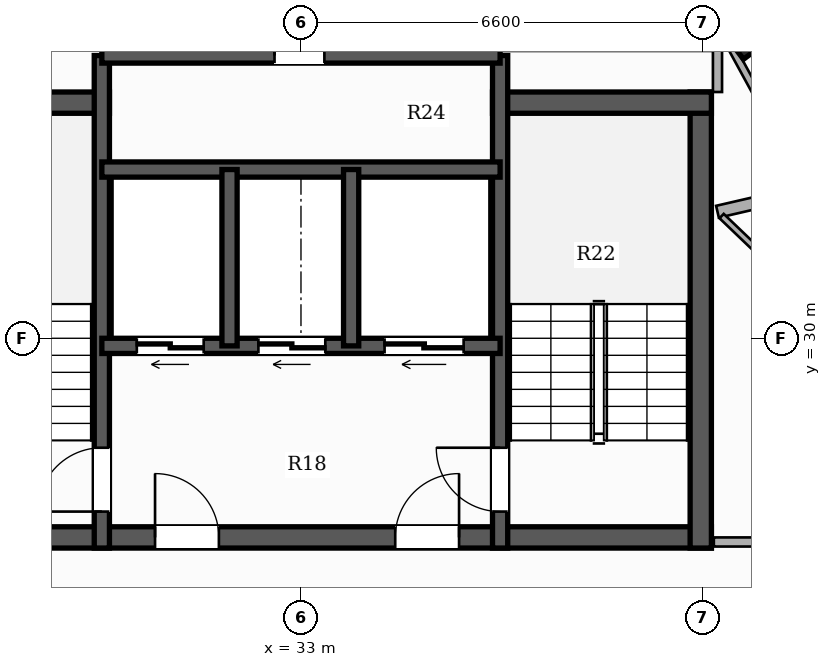
"""IFC4 building model, lengths in metres.
Left out: names, types, materials, properties, quantities, classifications, styles, units other than length and angle.
Written with IfcOpenShell. Run it as: python <this file> out.ifc"""

import sys

from ifc_helpers import new_model, si_unit, direction, frame, frame_2d, origin, origin_2d, place, context, subcontext, project, spatial, rectangle, hollow_rectangle, extrude, element, fill, save


model = new_model("IFC4")
c1 = context("Model", 3, precision=1e-05, world=origin(), true_north=direction((0.0, 1.0)))
c2 = subcontext(c1, "Body", "Model", "MODEL_VIEW")
j1 = project(units=[si_unit("LENGTHUNIT", "METRE"), si_unit("PLANEANGLEUNIT", "RADIAN")], contexts=[c1])
p1 = place(None, origin())
s1 = spatial("IfcSite", under=j1, at=p1, CompositionType="ELEMENT")
p2 = place(p1, origin())
s2 = spatial("IfcBuilding", under=s1, at=p2, CompositionType="ELEMENT")
p3 = place(p2, frame((0.0, 0.0, 222.8)))
s3 = spatial("IfcBuildingStorey", under=s2, at=p3, CompositionType="ELEMENT", Elevation=222.8)
p4 = place(p3, frame((26.25, 26.725, 0.0), z_axis=(0.0, 0.0, 1.0), x_axis=(1.0, 0.0, 0.0)))
e1 = element("IfcWall", 1, at=p4, inside=s3, PredefinedType="SHEAR", context=c2, shape_type="SweptSolid", body=[
    extrude(rectangle(XDim=13.5, YDim=0.35, at=frame_2d((6.75, 0.0))), origin(), (0.0, 0.0, 1.0), 3.3),
])
p5 = place(p4, frame((4.35, 0.0, 0.0)))
e2 = element("IfcOpeningElement", 2, at=p5, cuts=e1, PredefinedType="OPENING", context=c2, shape_type="SweptSolid", body=[
    extrude(rectangle(XDim=1.05, YDim=2.15, at=frame_2d((0.525, 1.075))), frame((0.0, 0.185, 0.0), z_axis=(0.0, -1.0, 0.0), x_axis=(1.0, 0.0, 0.0)), (0.0, 0.0, 1.0), 0.37),
])
p6 = place(p4, frame((8.3, 0.0, 0.0)))
e3 = element("IfcOpeningElement", 3, at=p6, cuts=e1, PredefinedType="OPENING", context=c2, shape_type="SweptSolid", body=[
    extrude(rectangle(XDim=1.05, YDim=2.15, at=frame_2d((0.525, 1.075))), frame((0.0, 0.185, 0.0), z_axis=(0.0, -1.0, 0.0), x_axis=(1.0, 0.0, 0.0)), (0.0, 0.0, 1.0), 0.37),
])
p7 = place(p3, frame((26.25, 33.875, 0.0), z_axis=(0.0, 0.0, 1.0), x_axis=(1.0, 0.0, 0.0)))
e4 = element("IfcWall", 4, at=p7, inside=s3, PredefinedType="SHEAR", context=c2, shape_type="SweptSolid", body=[
    extrude(rectangle(XDim=3.6, YDim=0.35, at=frame_2d((1.8, 0.0))), origin(), (0.0, 0.0, 1.0), 3.3),
])
p8 = place(p3, frame((39.575, 26.55, 0.0), z_axis=(0.0, 0.0, 1.0), x_axis=(0.0, 1.0, 0.0)))
e5 = element("IfcWall", 5, at=p8, inside=s3, PredefinedType="SHEAR", context=c2, shape_type="SweptSolid", body=[
    extrude(rectangle(XDim=7.5, YDim=0.35, at=frame_2d((3.75, 0.0))), origin(), (0.0, 0.0, 1.0), 3.3),
])
p9 = place(p3, frame((36.15, 33.875, 0.0), z_axis=(0.0, 0.0, 1.0), x_axis=(1.0, 0.0, 0.0)))
e6 = element("IfcWall", 6, at=p9, inside=s3, PredefinedType="SHEAR", context=c2, shape_type="SweptSolid", body=[
    extrude(rectangle(XDim=3.6, YDim=0.35, at=frame_2d((1.8, 0.0))), origin(), (0.0, 0.0, 1.0), 3.3),
])
p10 = place(p3, frame((29.725, 26.55, 0.0), z_axis=(0.0, 0.0, 1.0), x_axis=(0.0, 1.0, 0.0)))
e7 = element("IfcWall", 7, at=p10, inside=s3, PredefinedType="SHEAR", context=c2, shape_type="SweptSolid", body=[
    extrude(rectangle(XDim=8.1, YDim=0.25, at=frame_2d((4.05, 0.0))), origin(), (0.0, 0.0, 1.0), 3.3),
])
p11 = place(p10, frame((0.6, 0.0, 0.0)))
e8 = element("IfcOpeningElement", 8, at=p11, cuts=e7, PredefinedType="OPENING", context=c2, shape_type="SweptSolid", body=[
    extrude(rectangle(XDim=1.05, YDim=2.15, at=frame_2d((0.525, 1.075))), frame((0.0, 0.135, 0.0), z_axis=(0.0, -1.0, 0.0), x_axis=(1.0, 0.0, 0.0)), (0.0, 0.0, 1.0), 0.27),
])
p12 = place(p3, frame((36.275, 26.55, 0.0), z_axis=(0.0, 0.0, 1.0), x_axis=(0.0, 1.0, 0.0)))
e9 = element("IfcWall", 9, at=p12, inside=s3, PredefinedType="SHEAR", context=c2, shape_type="SweptSolid", body=[
    extrude(rectangle(XDim=8.1, YDim=0.25, at=frame_2d((4.05, 0.0))), origin(), (0.0, 0.0, 1.0), 3.3),
])
p13 = place(p12, frame((0.6, 0.0, 0.0)))
e10 = element("IfcOpeningElement", 10, at=p13, cuts=e9, PredefinedType="OPENING", context=c2, shape_type="SweptSolid", body=[
    extrude(rectangle(XDim=1.05, YDim=2.15, at=frame_2d((0.525, 1.075))), frame((0.0, 0.135, 0.0), z_axis=(0.0, -1.0, 0.0), x_axis=(1.0, 0.0, 0.0)), (0.0, 0.0, 1.0), 0.27),
])
p14 = place(p3, frame((36.275, 29.875, 0.0), z_axis=(0.0, 0.0, 1.0), x_axis=(-1.0, 0.0, 0.0)))
e11 = element("IfcWall", 11, at=p14, inside=s3, PredefinedType="SHEAR", context=c2, shape_type="SweptSolid", body=[
    extrude(rectangle(XDim=6.55, YDim=0.25, at=frame_2d((3.275, 0.0))), origin(), (0.0, 0.0, 1.0), 3.3),
])
p15 = place(p14, frame((4.875, 0.0, 0.0)))
e12 = element("IfcOpeningElement", 12, at=p15, cuts=e11, PredefinedType="OPENING", context=c2, shape_type="SweptSolid", body=[
    extrude(rectangle(XDim=1.1, YDim=2.2, at=frame_2d((0.55, 1.1))), frame((0.0, 0.135, 0.0), z_axis=(0.0, -1.0, 0.0), x_axis=(1.0, 0.0, 0.0)), (0.0, 0.0, 1.0), 0.27),
])
p16 = place(p14, frame((2.875, 0.0, 0.0)))
e13 = element("IfcOpeningElement", 13, at=p16, cuts=e11, PredefinedType="OPENING", context=c2, shape_type="SweptSolid", body=[
    extrude(rectangle(XDim=1.1, YDim=2.2, at=frame_2d((0.55, 1.1))), frame((0.0, 0.135, 0.0), z_axis=(0.0, -1.0, 0.0), x_axis=(1.0, 0.0, 0.0)), (0.0, 0.0, 1.0), 0.27),
])
p17 = place(p14, frame((0.6, 0.0, 0.0)))
e14 = element("IfcOpeningElement", 14, at=p17, cuts=e11, PredefinedType="OPENING", context=c2, shape_type="SweptSolid", body=[
    extrude(rectangle(XDim=1.3, YDim=2.2, at=frame_2d((0.65, 1.1))), frame((0.0, 0.135, 0.0), z_axis=(0.0, -1.0, 0.0), x_axis=(1.0, 0.0, 0.0)), (0.0, 0.0, 1.0), 0.27),
])
p18 = place(p3, frame((29.725, 32.775, 0.0), z_axis=(0.0, 0.0, 1.0), x_axis=(1.0, 0.0, 0.0)))
e15 = element("IfcWall", 15, at=p18, inside=s3, PredefinedType="SHEAR", context=c2, shape_type="SweptSolid", body=[
    extrude(rectangle(XDim=6.55, YDim=0.25, at=frame_2d((3.275, 0.0))), origin(), (0.0, 0.0, 1.0), 3.3),
])
for number, where, z_axis, x_axis in (
    (16, (31.825, 29.875, 0.0), (0.0, 0.0, 1.0), (0.0, 1.0, 0.0)),
    (17, (33.825, 29.875, 0.0), (0.0, 0.0, 1.0), (0.0, 1.0, 0.0)),
):
    element("IfcWall", number, at=place(p3, frame(where, z_axis=z_axis, x_axis=x_axis)), inside=s3, PredefinedType="SHEAR", context=c2, shape_type="SweptSolid", body=[
        extrude(rectangle(XDim=2.9, YDim=0.25, at=frame_2d((1.45, 0.0))), origin(), (0.0, 0.0, 1.0), 3.3),
    ])
p19 = place(p3, frame((29.725, 34.65, 0.0), z_axis=(0.0, 0.0, 1.0), x_axis=(1.0, 0.0, 0.0)))
e18 = element("IfcWall", 18, at=p19, inside=s3, PredefinedType="SHEAR", context=c2, shape_type="SweptSolid", body=[
    extrude(rectangle(XDim=6.55, YDim=0.25, at=frame_2d((3.275, 0.0))), origin(), (0.0, 0.0, 1.0), 3.3),
])
p20 = place(p19, frame((2.84, 0.0, 0.0)))
e19 = element("IfcOpeningElement", 19, at=p20, cuts=e18, PredefinedType="OPENING", context=c2, shape_type="SweptSolid", body=[
    extrude(rectangle(XDim=0.82, YDim=2.1, at=frame_2d((0.41, 1.05))), frame((0.0, 0.135, 0.0), z_axis=(0.0, -1.0, 0.0), x_axis=(1.0, 0.0, 0.0)), (0.0, 0.0, 1.0), 0.27),
])
p21 = place(p3, frame((40.352, 35.113, 0.0), z_axis=(0.0, 0.0, 1.0), x_axis=(-0.600420225326, 0.799684658487, 0.0)))
e20 = element("IfcColumn", 20, at=p21, inside=s3, PredefinedType="COLUMN", context=c2, shape_type="SweptSolid", body=[
    extrude(hollow_rectangle(XDim=0.75, YDim=0.75, WallThickness=0.025, at=origin_2d()), origin(), (0.0, 0.0, 1.0), 3.3),
])
p22 = place(p3, frame((39.79, 26.65, 0.0), z_axis=(0.0, 0.0, 1.0), x_axis=(1.0, 0.0, 0.0)))
e21 = element("IfcWall", 21, at=p22, inside=s3, PredefinedType="PARTITIONING", context=c2, shape_type="SweptSolid", body=[
    extrude(rectangle(XDim=2.46, YDim=0.15, at=frame_2d((1.23, 0.0))), origin(), (0.0, 0.0, 1.0), 2.565),
])
p23 = place(p3, frame((39.85, 34.74, 0.0), z_axis=(0.0, 0.0, 1.0), x_axis=(0.0, -1.0, 0.0)))
e22 = element("IfcWall", 22, at=p23, inside=s3, PredefinedType="PARTITIONING", context=c2, shape_type="SweptSolid", body=[
    extrude(rectangle(XDim=0.69, YDim=0.15, at=frame_2d((0.345, 0.0))), origin(), (0.0, 0.0, 1.0), 2.773),
])
p24 = place(p3, frame((39.85, 32.081, 0.0), z_axis=(0.0, 0.0, 1.0), x_axis=(0.974339670333, 0.225082666628, 0.0)))
e23 = element("IfcWall", 23, at=p24, inside=s3, PredefinedType="PARTITIONING", context=c2, shape_type="SweptSolid", body=[
    extrude(rectangle(XDim=4.714, YDim=0.2, at=frame_2d((2.357, 0.0))), origin(), (0.0, 0.0, 1.0), 2.492),
])
p25 = place(p3, frame((39.918, 32.01, 0.0), z_axis=(0.0, 0.0, 1.0), x_axis=(0.722311203135, -0.691568164266, 0.0)))
e24 = element("IfcWall", 24, at=p25, inside=s3, PredefinedType="PARTITIONING", context=c2, shape_type="SweptSolid", body=[
    extrude(rectangle(XDim=4.876, YDim=0.1, at=frame_2d((2.438, 0.0))), origin(), (0.0, 0.0, 1.0), 2.773),
])
p26 = place(p25, frame((1.998, 0.0, 0.0)))
e25 = element("IfcOpeningElement", 25, at=p26, cuts=e24, PredefinedType="OPENING", context=c2, shape_type="SweptSolid", body=[
    extrude(rectangle(XDim=0.88, YDim=2.1, at=frame_2d((0.44, 1.05))), frame((0.0, 0.06, 0.0), z_axis=(0.0, -1.0, 0.0), x_axis=(1.0, 0.0, 0.0)), (0.0, 0.0, 1.0), 0.12),
])
p27 = place(p3, frame((38.357, 37.934, 0.0), z_axis=(0.0, 0.0, 1.0), x_axis=(0.479839410825, -0.877356335715, 0.0)))
e26 = element("IfcWall", 26, at=p27, inside=s3, PredefinedType="PARTITIONING", context=c2, shape_type="SweptSolid", body=[
    extrude(rectangle(XDim=6.183, YDim=0.12, at=frame_2d((3.092, 0.0))), origin(), (0.0, 0.0, 1.0), 2.492),
])
p28 = place(p11, origin())
e27 = element("IfcDoor", 27, at=p28, inside=s3, OperationType="SINGLE_SWING_LEFT", PredefinedType="DOOR", context=c2, shape_type="SweptSolid", body=[
    extrude(rectangle(XDim=1.05, YDim=2.15, at=frame_2d((0.525, 1.075))), frame((0.0, 0.025, 0.0), z_axis=(0.0, -1.0, 0.0), x_axis=(1.0, 0.0, 0.0)), (0.0, 0.0, 1.0), 0.05),
])
fill(e8, e27)
p29 = place(p13, origin())
e28 = element("IfcDoor", 28, at=p29, inside=s3, OperationType="SINGLE_SWING_RIGHT", PredefinedType="DOOR", context=c2, shape_type="SweptSolid", body=[
    extrude(rectangle(XDim=1.05, YDim=2.15, at=frame_2d((0.525, 1.075))), frame((0.0, 0.025, 0.0), z_axis=(0.0, -1.0, 0.0), x_axis=(1.0, 0.0, 0.0)), (0.0, 0.0, 1.0), 0.05),
])
fill(e10, e28)
p30 = place(p5, origin())
e29 = element("IfcDoor", 29, at=p30, inside=s3, OperationType="SINGLE_SWING_LEFT", PredefinedType="DOOR", context=c2, shape_type="SweptSolid", body=[
    extrude(rectangle(XDim=1.05, YDim=2.15, at=frame_2d((0.525, 1.075))), frame((0.0, 0.025, 0.0), z_axis=(0.0, -1.0, 0.0), x_axis=(1.0, 0.0, 0.0)), (0.0, 0.0, 1.0), 0.05),
])
fill(e2, e29)
p31 = place(p6, origin())
e30 = element("IfcDoor", 30, at=p31, inside=s3, OperationType="SINGLE_SWING_RIGHT", PredefinedType="DOOR", context=c2, shape_type="SweptSolid", body=[
    extrude(rectangle(XDim=1.05, YDim=2.15, at=frame_2d((0.525, 1.075))), frame((0.0, 0.025, 0.0), z_axis=(0.0, -1.0, 0.0), x_axis=(1.0, 0.0, 0.0)), (0.0, 0.0, 1.0), 0.05),
])
fill(e3, e30)
p32 = place(p15, origin())
e31 = element("IfcDoor", 31, at=p32, inside=s3, OperationType="DOUBLE_DOOR_SLIDING", PredefinedType="DOOR", context=c2, shape_type="SweptSolid", body=[
    extrude(rectangle(XDim=1.1, YDim=2.2, at=frame_2d((0.55, 1.1))), frame((0.0, 0.025, 0.0), z_axis=(0.0, -1.0, 0.0), x_axis=(1.0, 0.0, 0.0)), (0.0, 0.0, 1.0), 0.05),
])
fill(e12, e31)
p33 = place(p16, origin())
e32 = element("IfcDoor", 32, at=p33, inside=s3, OperationType="DOUBLE_DOOR_SLIDING", PredefinedType="DOOR", context=c2, shape_type="SweptSolid", body=[
    extrude(rectangle(XDim=1.1, YDim=2.2, at=frame_2d((0.55, 1.1))), frame((0.0, 0.025, 0.0), z_axis=(0.0, -1.0, 0.0), x_axis=(1.0, 0.0, 0.0)), (0.0, 0.0, 1.0), 0.05),
])
fill(e13, e32)
p34 = place(p17, origin())
e33 = element("IfcDoor", 33, at=p34, inside=s3, OperationType="DOUBLE_DOOR_SLIDING", PredefinedType="DOOR", context=c2, shape_type="SweptSolid", body=[
    extrude(rectangle(XDim=1.3, YDim=2.2, at=frame_2d((0.65, 1.1))), frame((0.0, 0.025, 0.0), z_axis=(0.0, -1.0, 0.0), x_axis=(1.0, 0.0, 0.0)), (0.0, 0.0, 1.0), 0.05),
])
fill(e14, e33)
p35 = place(p20, origin())
e34 = element("IfcDoor", 34, at=p35, inside=s3, OperationType="SINGLE_SWING_LEFT", PredefinedType="DOOR", context=c2, shape_type="SweptSolid", body=[
    extrude(rectangle(XDim=0.82, YDim=2.1, at=frame_2d((0.41, 1.05))), frame((0.0, 0.025, 0.0), z_axis=(0.0, -1.0, 0.0), x_axis=(1.0, 0.0, 0.0)), (0.0, 0.0, 1.0), 0.05),
])
fill(e19, e34)
save(model, sys.argv[1])
